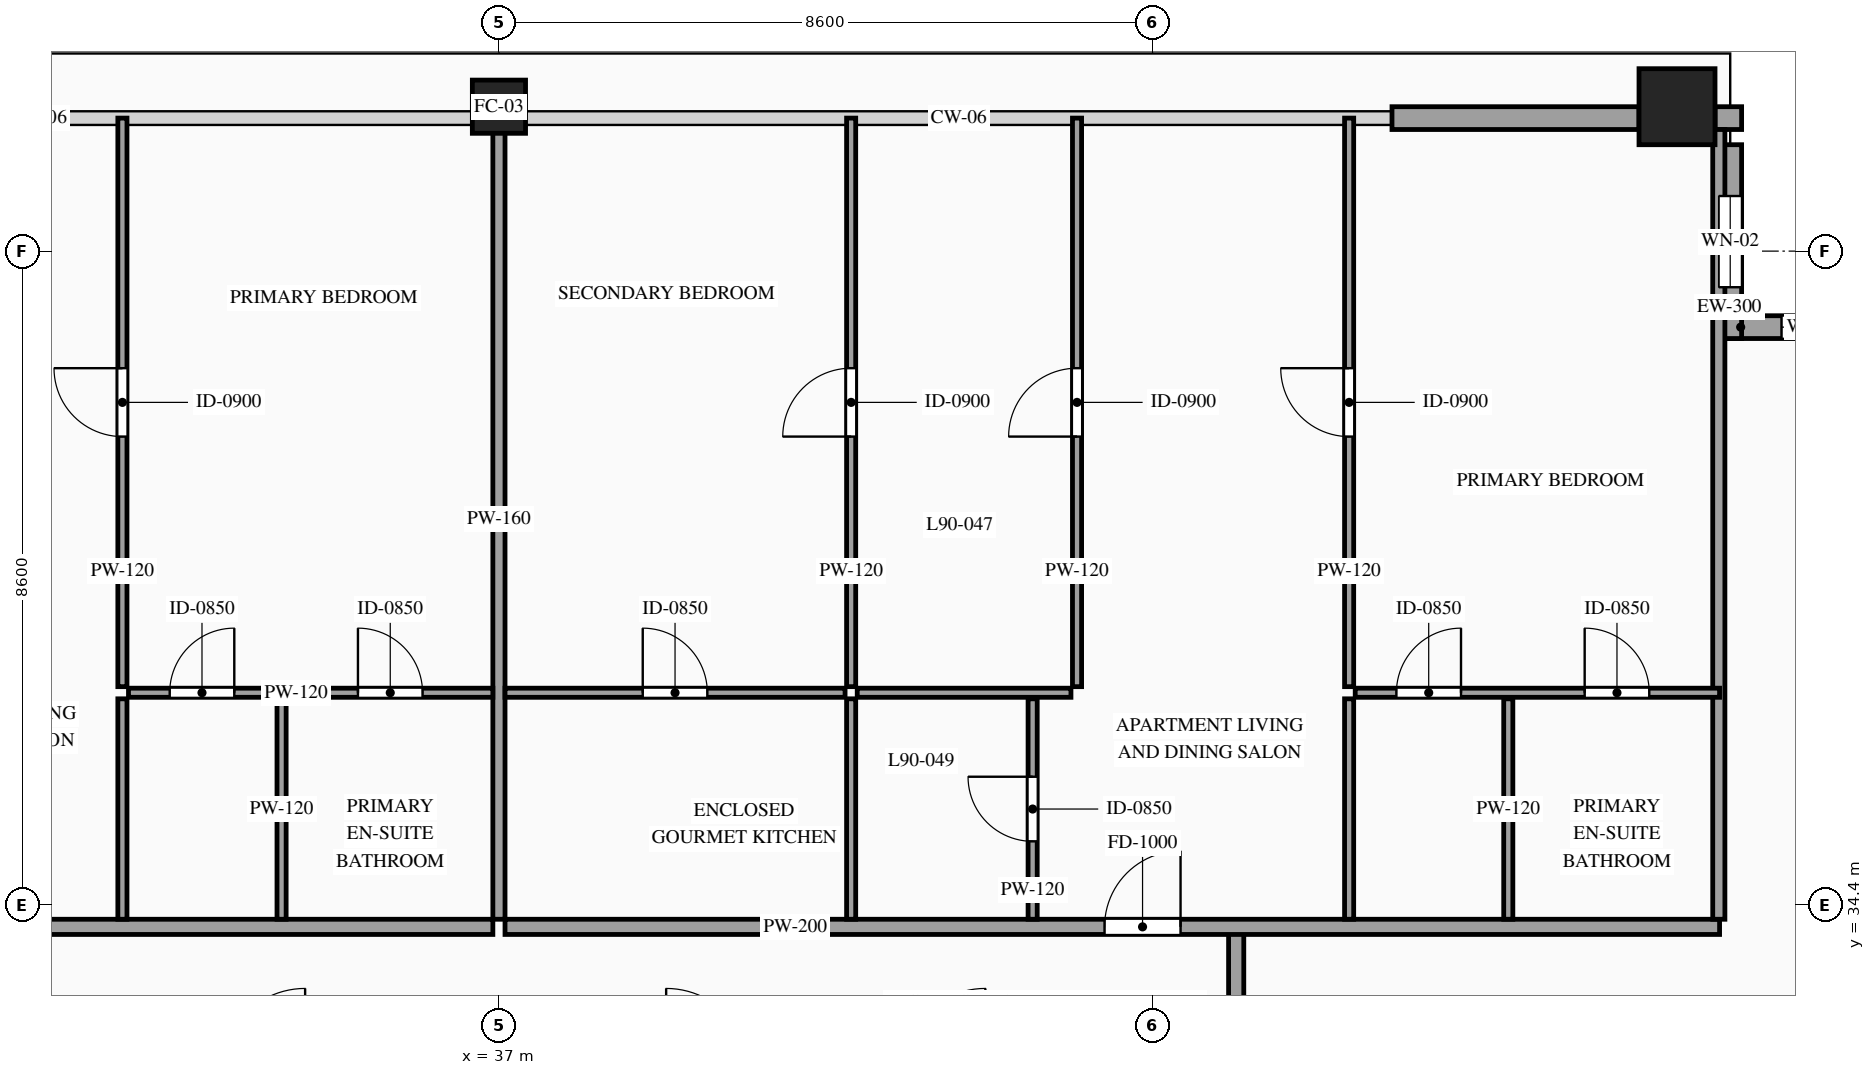
"""IFC4 building model, lengths in metres.
Left out: names, types, materials, properties, quantities, classifications, styles, units other than length and angle.
Written with IfcOpenShell. Run it as: python <this file> out.ifc"""

import sys

from ifc_helpers import new_model, si_unit, direction, frame, frame_2d, origin, origin_2d, place, context, subcontext, project, spatial, rectangle, hollow_rectangle, extrude, source, transform, mapped, element, fill, save


model = new_model("IFC4")
c1 = context("Model", 3, precision=1e-05, world=origin(), true_north=direction((0.0, 1.0)))
c2 = subcontext(c1, "Body", "Model", "MODEL_VIEW")
j1 = project(units=[si_unit("LENGTHUNIT", "METRE"), si_unit("PLANEANGLEUNIT", "RADIAN")], contexts=[c1])
p1 = place(None, origin())
s1 = spatial("IfcSite", under=j1, at=p1, CompositionType="ELEMENT")
p2 = place(p1, origin())
s2 = spatial("IfcBuilding", under=s1, at=p2, CompositionType="ELEMENT")
p3 = place(p2, frame((0.0, 0.0, 335.7)))
s3 = spatial("IfcBuildingStorey", under=s2, at=p3, CompositionType="ELEMENT", Elevation=335.7)
m1 = source(origin(), c2, "Body", "SweptSolid", [
    extrude(hollow_rectangle(XDim=0.7, YDim=0.7, WallThickness=0.032, at=origin_2d()), origin(), (0.0, 0.0, 1.0), 3.5),
])
p4 = place(p3, frame((37.0, 44.9, 0.0), z_axis=(0.0, 0.0, 1.0), x_axis=(1.0, 0.0, 0.0)))
e1 = element("IfcColumn", 1, at=p4, inside=s3, PredefinedType="COLUMN", context=c2, shape_type="MappedRepresentation", body=[
    mapped(m1, transform((0.0, 0.0, 0.0), scale=1.0)),
])
m2 = source(origin(), c2, "Body", "SweptSolid", [
    extrude(hollow_rectangle(XDim=1.0, YDim=1.0, WallThickness=0.048, at=origin_2d()), origin(), (0.0, 0.0, 1.0), 3.5),
])
p5 = place(p3, frame((52.5, 44.9, 0.0), z_axis=(0.0, 0.0, 1.0), x_axis=(1.0, 0.0, 0.0)))
e2 = element("IfcColumn", 2, at=p5, inside=s3, PredefinedType="COLUMN", context=c2, shape_type="MappedRepresentation", body=[
    mapped(m2, transform((0.0, 0.0, 0.0), scale=1.0)),
])
p6 = place(p3, frame((55.6, 42.0, 0.0), z_axis=(0.0, 0.0, 1.0), x_axis=(-1.0, 0.0, 0.0)))
e3 = element("IfcWall", 3, at=p6, inside=s3, PredefinedType="SOLIDWALL", context=c2, shape_type="SweptSolid", body=[
    extrude(rectangle(XDim=2.55, YDim=0.3, at=frame_2d((1.275, 0.0))), origin(), (0.0, 0.0, 1.0), 3.26),
])
p7 = place(p6, frame((0.825, 0.0, 0.85)))
e4 = element("IfcOpeningElement", 4, at=p7, cuts=e3, PredefinedType="OPENING", context=c2, shape_type="SweptSolid", body=[
    extrude(rectangle(XDim=0.9, YDim=1.5, at=frame_2d((0.45, 0.75))), frame((0.0, 0.165, 0.0), z_axis=(0.0, -1.0, 0.0), x_axis=(1.0, 0.0, 0.0)), (0.0, 0.0, 1.0), 0.33),
])
p8 = place(p3, frame((53.2, 41.85, 0.0), z_axis=(0.0, 0.0, 1.0), x_axis=(0.0, 1.0, 0.0)))
e5 = element("IfcWall", 5, at=p8, inside=s3, PredefinedType="SOLIDWALL", context=c2, shape_type="SweptSolid", body=[
    extrude(rectangle(XDim=2.55, YDim=0.3, at=frame_2d((1.275, 0.0))), origin(), (0.0, 0.0, 1.0), 3.26),
])
p9 = place(p8, frame((0.675, 0.0, 0.85)))
e6 = element("IfcOpeningElement", 6, at=p9, cuts=e5, PredefinedType="OPENING", context=c2, shape_type="SweptSolid", body=[
    extrude(rectangle(XDim=1.2, YDim=2.1, at=frame_2d((0.6, 1.05))), frame((0.0, 0.165, 0.0), z_axis=(0.0, -1.0, 0.0), x_axis=(1.0, 0.0, 0.0)), (0.0, 0.0, 1.0), 0.33),
])
m3 = source(origin(), c2, "Body", "SweptSolid", [
    extrude(rectangle(XDim=0.35, YDim=0.3, at=frame_2d((0.175, 0.0))), origin(), (0.0, 0.0, 1.0), 3.26),
])
p10 = place(p3, frame((53.0, 44.75, 0.0), z_axis=(0.0, 0.0, 1.0), x_axis=(1.0, 0.0, 0.0)))
e7 = element("IfcWall", 7, at=p10, inside=s3, PredefinedType="SOLIDWALL", context=c2, shape_type="MappedRepresentation", body=[
    mapped(m3, transform((0.0, 0.0, 0.0), scale=1.0)),
])
m4 = source(origin(), c2, "Body", "SweptSolid", [
    extrude(rectangle(XDim=3.25, YDim=0.3, at=frame_2d((1.625, 0.0))), origin(), (0.0, 0.0, 1.0), 2.865),
])
p11 = place(p3, frame((48.75, 44.75, 0.0), z_axis=(0.0, 0.0, 1.0), x_axis=(1.0, 0.0, 0.0)))
e8 = element("IfcWall", 8, at=p11, inside=s3, PredefinedType="SOLIDWALL", context=c2, shape_type="MappedRepresentation", body=[
    mapped(m4, transform((0.0, 0.0, 0.0), scale=1.0)),
])
m5 = source(origin(), c2, "Body", "SweptSolid", [
    extrude(rectangle(XDim=1.7, YDim=0.2, at=frame_2d((0.85, 0.0))), origin(), (0.0, 0.0, 1.0), 3.26),
])
p12 = place(p3, frame((46.7, 32.35, 0.0), z_axis=(0.0, 0.0, 1.0), x_axis=(0.0, 1.0, 0.0)))
e9 = element("IfcWall", 9, at=p12, inside=s3, PredefinedType="PARTITIONING", context=c2, shape_type="MappedRepresentation", body=[
    mapped(m5, transform((0.0, 0.0, 0.0), scale=1.0)),
])
p13 = place(p3, frame((20.94, 34.11, 0.0), z_axis=(0.0, 0.0, 1.0), x_axis=(1.0, 0.0, 0.0)))
e10 = element("IfcWall", 10, at=p13, inside=s3, PredefinedType="PARTITIONING", context=c2, shape_type="SweptSolid", body=[
    extrude(rectangle(XDim=15.98, YDim=0.2, at=frame_2d((7.99, 0.0))), origin(), (0.0, 0.0, 1.0), 3.26),
])
p14 = place(p13, frame((8.816, 0.0, 0.0)))
e11 = element("IfcOpeningElement", 11, at=p14, cuts=e10, PredefinedType="OPENING", context=c2, shape_type="SweptSolid", body=[
    extrude(rectangle(XDim=1.0, YDim=2.2, at=frame_2d((0.5, 1.1))), frame((0.0, 0.115, 0.0), z_axis=(0.0, -1.0, 0.0), x_axis=(1.0, 0.0, 0.0)), (0.0, 0.0, 1.0), 0.23),
])
m6 = source(origin(), c2, "Body", "SweptSolid", [
    extrude(rectangle(XDim=10.54, YDim=0.16, at=frame_2d((5.27, 0.0))), origin(), (0.0, 0.0, 1.0), 2.767),
])
p15 = place(p3, frame((37.0, 34.21, 0.0), z_axis=(0.0, 0.0, 1.0), x_axis=(0.0, 1.0, 0.0)))
e12 = element("IfcWall", 12, at=p15, inside=s3, PredefinedType="PARTITIONING", context=c2, shape_type="MappedRepresentation", body=[
    mapped(m6, transform((0.0, 0.0, 0.0), scale=1.0)),
])
m7 = source(origin(), c2, "Body", "SweptSolid", [
    extrude(rectangle(XDim=2.9, YDim=0.12, at=frame_2d((1.45, 0.0))), origin(), (0.0, 0.0, 1.0), 3.26),
])
for number, where, z_axis, x_axis in (
    (13, (34.14, 34.21, 0.0), (0.0, 0.0, 1.0), (0.0, 1.0, 0.0)),
    (14, (32.046, 34.21, 0.0), (0.0, 0.0, 1.0), (0.0, 1.0, 0.0)),
):
    element("IfcWall", number, at=place(p3, frame(where, z_axis=z_axis, x_axis=x_axis)), inside=s3, PredefinedType="PARTITIONING", context=c2, shape_type="MappedRepresentation", body=[
        mapped(m7, transform((0.0, 0.0, 0.0), scale=1.0)),
    ])
p16 = place(p3, frame((32.126, 37.19, 0.0), z_axis=(0.0, 0.0, 1.0), x_axis=(1.0, 0.0, 0.0)))
e15 = element("IfcWall", 15, at=p16, inside=s3, PredefinedType="PARTITIONING", context=c2, shape_type="SweptSolid", body=[
    extrude(rectangle(XDim=4.794, YDim=0.12, at=frame_2d((2.397, 0.0))), origin(), (0.0, 0.0, 1.0), 3.26),
])
p17 = place(p16, frame((3.019, 0.0, 0.0)))
e16 = element("IfcOpeningElement", 16, at=p17, cuts=e15, PredefinedType="OPENING", context=c2, shape_type="SweptSolid", body=[
    extrude(rectangle(XDim=0.85, YDim=2.1, at=frame_2d((0.425, 1.05))), frame((0.0, 0.075, 0.0), z_axis=(0.0, -1.0, 0.0), x_axis=(1.0, 0.0, 0.0)), (0.0, 0.0, 1.0), 0.15),
])
p18 = place(p16, frame((0.542, 0.0, 0.0)))
e17 = element("IfcOpeningElement", 17, at=p18, cuts=e15, PredefinedType="OPENING", context=c2, shape_type="SweptSolid", body=[
    extrude(rectangle(XDim=0.85, YDim=2.1, at=frame_2d((0.425, 1.05))), frame((0.0, 0.075, 0.0), z_axis=(0.0, -1.0, 0.0), x_axis=(1.0, 0.0, 0.0)), (0.0, 0.0, 1.0), 0.15),
])
p19 = place(p3, frame((32.046, 37.27, 0.0), z_axis=(0.0, 0.0, 1.0), x_axis=(0.0, 1.0, 0.0)))
e18 = element("IfcWall", 18, at=p19, inside=s3, PredefinedType="PARTITIONING", context=c2, shape_type="SweptSolid", body=[
    extrude(rectangle(XDim=7.48, YDim=0.12, at=frame_2d((3.74, 0.0))), origin(), (0.0, 0.0, 1.0), 3.26),
])
p20 = place(p19, frame((3.29, 0.0, 0.0)))
e19 = element("IfcOpeningElement", 19, at=p20, cuts=e18, PredefinedType="OPENING", context=c2, shape_type="SweptSolid", body=[
    extrude(rectangle(XDim=0.9, YDim=2.15, at=frame_2d((0.45, 1.075))), frame((0.0, 0.075, 0.0), z_axis=(0.0, -1.0, 0.0), x_axis=(1.0, 0.0, 0.0)), (0.0, 0.0, 1.0), 0.15),
])
p21 = place(p3, frame((37.08, 34.11, 0.0), z_axis=(0.0, 0.0, 1.0), x_axis=(1.0, 0.0, 0.0)))
e20 = element("IfcWall", 20, at=p21, inside=s3, PredefinedType="PARTITIONING", context=c2, shape_type="SweptSolid", body=[
    extrude(rectangle(XDim=15.98, YDim=0.2, at=frame_2d((7.99, 0.0))), origin(), (0.0, 0.0, 1.0), 3.26),
])
p22 = place(p21, frame((7.888, 0.0, 0.0)))
e21 = element("IfcOpeningElement", 21, at=p22, cuts=e20, PredefinedType="OPENING", context=c2, shape_type="SweptSolid", body=[
    extrude(rectangle(XDim=1.0, YDim=2.2, at=frame_2d((0.5, 1.1))), frame((0.0, 0.115, 0.0), z_axis=(0.0, -1.0, 0.0), x_axis=(1.0, 0.0, 0.0)), (0.0, 0.0, 1.0), 0.23),
])
m8 = source(origin(), c2, "Body", "SweptSolid", [
    extrude(rectangle(XDim=10.39, YDim=0.16, at=frame_2d((5.195, 0.0))), origin(), (0.0, 0.0, 1.0), 3.26),
])
p23 = place(p3, frame((53.05, 34.21, 0.0), z_axis=(0.0, 0.0, 1.0), x_axis=(0.0, 1.0, 0.0)))
e22 = element("IfcWall", 22, at=p23, inside=s3, PredefinedType="PARTITIONING", context=c2, shape_type="MappedRepresentation", body=[
    mapped(m8, transform((0.0, 0.0, 0.0), scale=1.0)),
])
p24 = place(p3, frame((37.08, 37.19, 0.0), z_axis=(0.0, 0.0, 1.0), x_axis=(1.0, 0.0, 0.0)))
e23 = element("IfcWall", 23, at=p24, inside=s3, PredefinedType="PARTITIONING", context=c2, shape_type="SweptSolid", body=[
    extrude(rectangle(XDim=4.474, YDim=0.12, at=frame_2d((2.237, 0.0))), origin(), (0.0, 0.0, 1.0), 3.26),
])
p25 = place(p24, frame((1.812, 0.0, 0.0)))
e24 = element("IfcOpeningElement", 24, at=p25, cuts=e23, PredefinedType="OPENING", context=c2, shape_type="SweptSolid", body=[
    extrude(rectangle(XDim=0.85, YDim=2.1, at=frame_2d((0.425, 1.05))), frame((0.0, 0.075, 0.0), z_axis=(0.0, -1.0, 0.0), x_axis=(1.0, 0.0, 0.0)), (0.0, 0.0, 1.0), 0.15),
])
p26 = place(p3, frame((41.634, 34.21, 0.0), z_axis=(0.0, 0.0, 1.0), x_axis=(0.0, 1.0, 0.0)))
e25 = element("IfcWall", 25, at=p26, inside=s3, PredefinedType="PARTITIONING", context=c2, shape_type="MappedRepresentation", body=[
    mapped(m7, transform((0.0, 0.0, 0.0), scale=1.0)),
])
p27 = place(p3, frame((44.022, 34.21, 0.0), z_axis=(0.0, 0.0, 1.0), x_axis=(0.0, 1.0, 0.0)))
e26 = element("IfcWall", 26, at=p27, inside=s3, PredefinedType="PARTITIONING", context=c2, shape_type="SweptSolid", body=[
    extrude(rectangle(XDim=2.9, YDim=0.12, at=frame_2d((1.45, 0.0))), origin(), (0.0, 0.0, 1.0), 3.26),
])
p28 = place(p27, frame((1.025, 0.0, 0.0)))
e27 = element("IfcOpeningElement", 27, at=p28, cuts=e26, PredefinedType="OPENING", context=c2, shape_type="SweptSolid", body=[
    extrude(rectangle(XDim=0.85, YDim=2.1, at=frame_2d((0.425, 1.05))), frame((0.0, 0.075, 0.0), z_axis=(0.0, -1.0, 0.0), x_axis=(1.0, 0.0, 0.0)), (0.0, 0.0, 1.0), 0.15),
])
m9 = source(origin(), c2, "Body", "SweptSolid", [
    extrude(rectangle(XDim=2.9, YDim=0.12, at=frame_2d((1.45, 0.0))), origin(), (0.0, 0.0, 1.0), 2.805),
])
p29 = place(p3, frame((50.28, 34.21, 0.0), z_axis=(0.0, 0.0, 1.0), x_axis=(0.0, 1.0, 0.0)))
e28 = element("IfcWall", 28, at=p29, inside=s3, PredefinedType="PARTITIONING", context=c2, shape_type="MappedRepresentation", body=[
    mapped(m9, transform((0.0, 0.0, 0.0), scale=1.0)),
])
p30 = place(p3, frame((48.186, 34.21, 0.0), z_axis=(0.0, 0.0, 1.0), x_axis=(0.0, 1.0, 0.0)))
e29 = element("IfcWall", 29, at=p30, inside=s3, PredefinedType="PARTITIONING", context=c2, shape_type="MappedRepresentation", body=[
    mapped(m7, transform((0.0, 0.0, 0.0), scale=1.0)),
])
p31 = place(p3, frame((41.634, 37.27, 0.0), z_axis=(0.0, 0.0, 1.0), x_axis=(0.0, 1.0, 0.0)))
e30 = element("IfcWall", 30, at=p31, inside=s3, PredefinedType="PARTITIONING", context=c2, shape_type="SweptSolid", body=[
    extrude(rectangle(XDim=7.48, YDim=0.12, at=frame_2d((3.74, 0.0))), origin(), (0.0, 0.0, 1.0), 3.26),
])
p32 = place(p31, frame((3.29, 0.0, 0.0)))
e31 = element("IfcOpeningElement", 31, at=p32, cuts=e30, PredefinedType="OPENING", context=c2, shape_type="SweptSolid", body=[
    extrude(rectangle(XDim=0.9, YDim=2.15, at=frame_2d((0.45, 1.075))), frame((0.0, 0.075, 0.0), z_axis=(0.0, -1.0, 0.0), x_axis=(1.0, 0.0, 0.0)), (0.0, 0.0, 1.0), 0.15),
])
p33 = place(p3, frame((48.266, 37.19, 0.0), z_axis=(0.0, 0.0, 1.0), x_axis=(1.0, 0.0, 0.0)))
e32 = element("IfcWall", 32, at=p33, inside=s3, PredefinedType="PARTITIONING", context=c2, shape_type="SweptSolid", body=[
    extrude(rectangle(XDim=4.794, YDim=0.12, at=frame_2d((2.397, 0.0))), origin(), (0.0, 0.0, 1.0), 3.26),
])
p34 = place(p33, frame((3.019, 0.0, 0.0)))
e33 = element("IfcOpeningElement", 33, at=p34, cuts=e32, PredefinedType="OPENING", context=c2, shape_type="SweptSolid", body=[
    extrude(rectangle(XDim=0.85, YDim=2.1, at=frame_2d((0.425, 1.05))), frame((0.0, 0.075, 0.0), z_axis=(0.0, -1.0, 0.0), x_axis=(1.0, 0.0, 0.0)), (0.0, 0.0, 1.0), 0.15),
])
p35 = place(p33, frame((0.542, 0.0, 0.0)))
e34 = element("IfcOpeningElement", 34, at=p35, cuts=e32, PredefinedType="OPENING", context=c2, shape_type="SweptSolid", body=[
    extrude(rectangle(XDim=0.85, YDim=2.1, at=frame_2d((0.425, 1.05))), frame((0.0, 0.075, 0.0), z_axis=(0.0, -1.0, 0.0), x_axis=(1.0, 0.0, 0.0)), (0.0, 0.0, 1.0), 0.15),
])
p36 = place(p3, frame((48.186, 37.27, 0.0), z_axis=(0.0, 0.0, 1.0), x_axis=(0.0, 1.0, 0.0)))
e35 = element("IfcWall", 35, at=p36, inside=s3, PredefinedType="PARTITIONING", context=c2, shape_type="SweptSolid", body=[
    extrude(rectangle(XDim=7.48, YDim=0.12, at=frame_2d((3.74, 0.0))), origin(), (0.0, 0.0, 1.0), 3.26),
])
p37 = place(p36, frame((3.29, 0.0, 0.0)))
e36 = element("IfcOpeningElement", 36, at=p37, cuts=e35, PredefinedType="OPENING", context=c2, shape_type="SweptSolid", body=[
    extrude(rectangle(XDim=0.9, YDim=2.15, at=frame_2d((0.45, 1.075))), frame((0.0, 0.075, 0.0), z_axis=(0.0, -1.0, 0.0), x_axis=(1.0, 0.0, 0.0)), (0.0, 0.0, 1.0), 0.15),
])
m10 = source(origin(), c2, "Body", "SweptSolid", [
    extrude(rectangle(XDim=2.812, YDim=0.12, at=frame_2d((1.406, 0.0))), origin(), (0.0, 0.0, 1.0), 3.26),
])
p38 = place(p3, frame((41.714, 37.19, 0.0), z_axis=(0.0, 0.0, 1.0), x_axis=(1.0, 0.0, 0.0)))
e37 = element("IfcWall", 37, at=p38, inside=s3, PredefinedType="PARTITIONING", context=c2, shape_type="MappedRepresentation", body=[
    mapped(m10, transform((0.0, 0.0, 0.0), scale=1.0)),
])
p39 = place(p3, frame((44.606, 37.27, 0.0), z_axis=(0.0, 0.0, 1.0), x_axis=(0.0, 1.0, 0.0)))
e38 = element("IfcWall", 38, at=p39, inside=s3, PredefinedType="PARTITIONING", context=c2, shape_type="SweptSolid", body=[
    extrude(rectangle(XDim=7.48, YDim=0.12, at=frame_2d((3.74, 0.0))), origin(), (0.0, 0.0, 1.0), 3.26),
])
p40 = place(p39, frame((3.29, 0.0, 0.0)))
e39 = element("IfcOpeningElement", 39, at=p40, cuts=e38, PredefinedType="OPENING", context=c2, shape_type="SweptSolid", body=[
    extrude(rectangle(XDim=0.9, YDim=2.15, at=frame_2d((0.45, 1.075))), frame((0.0, 0.075, 0.0), z_axis=(0.0, -1.0, 0.0), x_axis=(1.0, 0.0, 0.0)), (0.0, 0.0, 1.0), 0.15),
])
m11 = source(origin(), c2, "Body", "SweptSolid", [
    extrude(rectangle(XDim=0.9, YDim=1.5, at=frame_2d((0.45, 0.75))), frame((0.0, 0.03, 0.0), z_axis=(0.0, -1.0, 0.0), x_axis=(1.0, 0.0, 0.0)), (0.0, 0.0, 1.0), 0.06),
])
p41 = place(p7, origin())
e40 = element("IfcWindow", 40, at=p41, inside=s3, PartitioningType="SINGLE_PANEL", PredefinedType="WINDOW", context=c2, shape_type="MappedRepresentation", body=[
    mapped(m11, transform((0.0, 0.0, 0.0), scale=1.0)),
])
fill(e4, e40)
m12 = source(origin(), c2, "Body", "SweptSolid", [
    extrude(rectangle(XDim=1.2, YDim=2.1, at=frame_2d((0.6, 1.05))), frame((0.0, 0.03, 0.0), z_axis=(0.0, -1.0, 0.0), x_axis=(1.0, 0.0, 0.0)), (0.0, 0.0, 1.0), 0.06),
])
p42 = place(p9, origin())
e41 = element("IfcWindow", 41, at=p42, inside=s3, PartitioningType="SINGLE_PANEL", PredefinedType="WINDOW", context=c2, shape_type="MappedRepresentation", body=[
    mapped(m12, transform((0.0, 0.0, 0.0), scale=1.0)),
])
fill(e6, e41)
m13 = source(origin(), c2, "Body", "SweptSolid", [
    extrude(rectangle(XDim=0.85, YDim=2.1, at=frame_2d((0.425, 1.05))), frame((0.0, 0.025, 0.0), z_axis=(0.0, -1.0, 0.0), x_axis=(1.0, 0.0, 0.0)), (0.0, 0.0, 1.0), 0.05),
])
p43 = place(p17, origin())
e42 = element("IfcDoor", 42, at=p43, inside=s3, OperationType="SINGLE_SWING_LEFT", PredefinedType="DOOR", context=c2, shape_type="MappedRepresentation", body=[
    mapped(m13, transform((0.0, 0.0, 0.0), scale=1.0)),
])
fill(e16, e42)
p44 = place(p18, origin())
e43 = element("IfcDoor", 43, at=p44, inside=s3, OperationType="SINGLE_SWING_RIGHT", PredefinedType="DOOR", context=c2, shape_type="MappedRepresentation", body=[
    mapped(m13, transform((0.0, 0.0, 0.0), scale=1.0)),
])
fill(e17, e43)
m14 = source(origin(), c2, "Body", "SweptSolid", [
    extrude(rectangle(XDim=0.9, YDim=2.15, at=frame_2d((0.45, 1.075))), frame((0.0, 0.025, 0.0), z_axis=(0.0, -1.0, 0.0), x_axis=(1.0, 0.0, 0.0)), (0.0, 0.0, 1.0), 0.05),
])
p45 = place(p20, origin())
e44 = element("IfcDoor", 44, at=p45, inside=s3, OperationType="SINGLE_SWING_RIGHT", PredefinedType="DOOR", context=c2, shape_type="MappedRepresentation", body=[
    mapped(m14, transform((0.0, 0.0, 0.0), scale=1.0)),
])
fill(e19, e44)
m15 = source(origin(), c2, "Body", "SweptSolid", [
    extrude(rectangle(XDim=1.0, YDim=2.2, at=frame_2d((0.5, 1.1))), frame((0.0, 0.025, 0.0), z_axis=(0.0, -1.0, 0.0), x_axis=(1.0, 0.0, 0.0)), (0.0, 0.0, 1.0), 0.05),
])
p46 = place(p22, origin())
e45 = element("IfcDoor", 45, at=p46, inside=s3, OperationType="SINGLE_SWING_RIGHT", PredefinedType="DOOR", context=c2, shape_type="MappedRepresentation", body=[
    mapped(m15, transform((0.0, 0.0, 0.0), scale=1.0)),
])
fill(e21, e45)
p47 = place(p25, origin())
e46 = element("IfcDoor", 46, at=p47, inside=s3, OperationType="SINGLE_SWING_LEFT", PredefinedType="DOOR", context=c2, shape_type="MappedRepresentation", body=[
    mapped(m13, transform((0.0, 0.0, 0.0), scale=1.0)),
])
fill(e24, e46)
p48 = place(p28, origin())
e47 = element("IfcDoor", 47, at=p48, inside=s3, OperationType="SINGLE_SWING_RIGHT", PredefinedType="DOOR", context=c2, shape_type="MappedRepresentation", body=[
    mapped(m13, transform((0.0, 0.0, 0.0), scale=1.0)),
])
fill(e27, e47)
p49 = place(p34, origin())
e48 = element("IfcDoor", 48, at=p49, inside=s3, OperationType="SINGLE_SWING_LEFT", PredefinedType="DOOR", context=c2, shape_type="MappedRepresentation", body=[
    mapped(m13, transform((0.0, 0.0, 0.0), scale=1.0)),
])
fill(e33, e48)
p50 = place(p35, origin())
e49 = element("IfcDoor", 49, at=p50, inside=s3, OperationType="SINGLE_SWING_RIGHT", PredefinedType="DOOR", context=c2, shape_type="MappedRepresentation", body=[
    mapped(m13, transform((0.0, 0.0, 0.0), scale=1.0)),
])
fill(e34, e49)
p51 = place(p32, origin())
e50 = element("IfcDoor", 50, at=p51, inside=s3, OperationType="SINGLE_SWING_LEFT", PredefinedType="DOOR", context=c2, shape_type="MappedRepresentation", body=[
    mapped(m14, transform((0.0, 0.0, 0.0), scale=1.0)),
])
fill(e31, e50)
p52 = place(p37, origin())
e51 = element("IfcDoor", 51, at=p52, inside=s3, OperationType="SINGLE_SWING_RIGHT", PredefinedType="DOOR", context=c2, shape_type="MappedRepresentation", body=[
    mapped(m14, transform((0.0, 0.0, 0.0), scale=1.0)),
])
fill(e36, e51)
p53 = place(p40, origin())
e52 = element("IfcDoor", 52, at=p53, inside=s3, OperationType="SINGLE_SWING_LEFT", PredefinedType="DOOR", context=c2, shape_type="MappedRepresentation", body=[
    mapped(m14, transform((0.0, 0.0, 0.0), scale=1.0)),
])
fill(e39, e52)
save(model, sys.argv[1])
